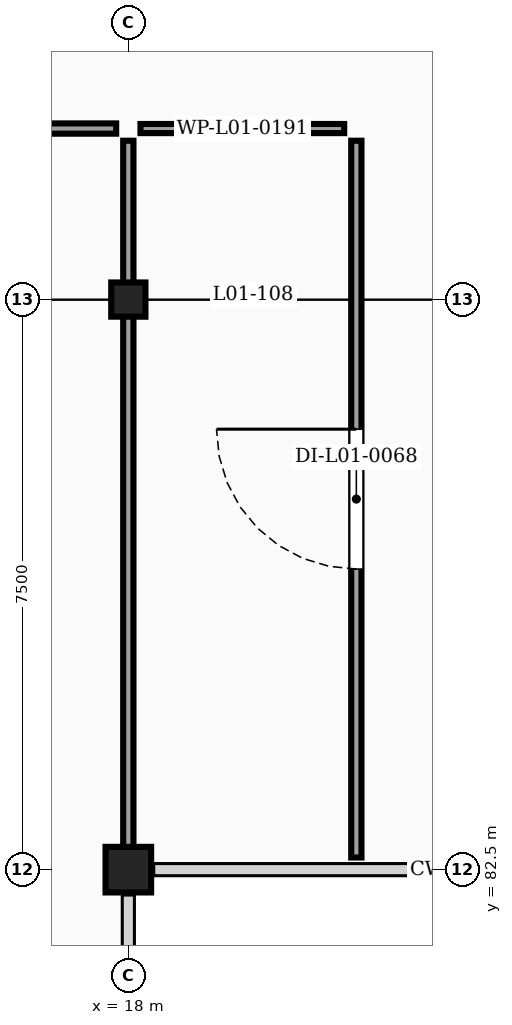
"""IFC4 building model, lengths in metres.
Left out: names, types, materials, properties, quantities, classifications, styles, units other than length and angle.
Written with IfcOpenShell. Run it as: python <this file> out.ifc"""

import sys

from ifc_helpers import new_model, si_unit, direction, frame, frame_2d, origin, origin_2d, place, context, subcontext, project, spatial, rectangle, extrude, element, fill, save


model = new_model("IFC4")
c1 = context("Model", 3, precision=1e-05, world=origin(), true_north=direction((0.0, 1.0)))
c2 = subcontext(c1, "Body", "Model", "MODEL_VIEW")
j1 = project(units=[si_unit("LENGTHUNIT", "METRE"), si_unit("PLANEANGLEUNIT", "RADIAN")], contexts=[c1])
p1 = place(None, origin())
s1 = spatial("IfcSite", under=j1, at=p1, CompositionType="ELEMENT")
p2 = place(p1, origin())
s2 = spatial("IfcBuilding", under=s1, at=p2, CompositionType="ELEMENT")
p3 = place(p2, frame((0.0, 0.0, 4.5)))
s3 = spatial("IfcBuildingStorey", under=s2, at=p3, CompositionType="ELEMENT", Elevation=4.5)
p4 = place(p3, frame((18.0, 82.5, 0.0), z_axis=(0.0, 0.0, 1.0), x_axis=(1.0, 0.0, 0.0)))
e1 = element("IfcColumn", 1, at=p4, inside=s3, PredefinedType="COLUMN", context=c2, shape_type="SweptSolid", body=[
    extrude(rectangle(XDim=0.6, YDim=0.6, at=origin_2d()), origin(), (0.0, 0.0, 1.0), 4.0),
])
p5 = place(p3, frame((18.0, 90.0, 0.0), z_axis=(0.0, 0.0, 1.0), x_axis=(1.0, 0.0, 0.0)))
e2 = element("IfcColumn", 2, at=p5, inside=s3, PredefinedType="COLUMN", context=c2, shape_type="SweptSolid", body=[
    extrude(rectangle(XDim=0.45, YDim=0.45, at=origin_2d()), origin(), (0.0, 0.0, 1.0), 4.0),
])
p6 = place(p3, frame((17.84, 92.25, 0.0), z_axis=(0.0, 0.0, 1.0), x_axis=(-1.0, 0.0, 0.0)))
e3 = element("IfcWall", 3, at=p6, inside=s3, PredefinedType="PARTITIONING", context=c2, shape_type="SweptSolid", body=[
    extrude(rectangle(XDim=4.34, YDim=0.135, at=frame_2d((2.17, 0.0))), origin(), (0.0, 0.0, 1.0), 3.76),
])
p7 = place(p6, frame((1.29, 0.0, 0.0)))
e4 = element("IfcOpeningElement", 4, at=p7, cuts=e3, PredefinedType="OPENING", context=c2, shape_type="SweptSolid", body=[
    extrude(rectangle(XDim=1.76, YDim=2.22, at=frame_2d((0.88, 1.11))), frame((0.0, 0.077, 0.0), z_axis=(0.0, -1.0, 0.0), x_axis=(1.0, 0.0, 0.0)), (0.0, 0.0, 1.0), 0.155),
])
p8 = place(p3, frame((21.0, 82.66, 0.0), z_axis=(0.0, 0.0, 1.0), x_axis=(0.0, 1.0, 0.0)))
e5 = element("IfcWall", 5, at=p8, inside=s3, PredefinedType="PARTITIONING", context=c2, shape_type="SweptSolid", body=[
    extrude(rectangle(XDim=9.43, YDim=0.135, at=frame_2d((4.715, 0.0))), origin(), (0.0, 0.0, 1.0), 3.302),
])
p9 = place(p8, frame((3.795, 0.0, 0.0)))
e6 = element("IfcOpeningElement", 6, at=p9, cuts=e5, PredefinedType="OPENING", context=c2, shape_type="SweptSolid", body=[
    extrude(rectangle(XDim=1.84, YDim=2.22, at=frame_2d((0.92, 1.11))), frame((0.0, 0.077, 0.0), z_axis=(0.0, -1.0, 0.0), x_axis=(1.0, 0.0, 0.0)), (0.0, 0.0, 1.0), 0.155),
])
p10 = place(p3, frame((20.84, 92.25, 0.0), z_axis=(0.0, 0.0, 1.0), x_axis=(-1.0, 0.0, 0.0)))
e7 = element("IfcWall", 7, at=p10, inside=s3, PredefinedType="PARTITIONING", context=c2, shape_type="SweptSolid", body=[
    extrude(rectangle(XDim=2.68, YDim=0.12, at=frame_2d((1.34, 0.0))), origin(), (0.0, 0.0, 1.0), 3.76),
])
p11 = place(p3, frame((18.0, 82.66, 0.0), z_axis=(0.0, 0.0, 1.0), x_axis=(0.0, 1.0, 0.0)))
e8 = element("IfcWall", 8, at=p11, inside=s3, PredefinedType="PARTITIONING", context=c2, shape_type="SweptSolid", body=[
    extrude(rectangle(XDim=9.43, YDim=0.135, at=frame_2d((4.715, 0.0))), origin(), (0.0, 0.0, 1.0), 2.96),
])
p12 = place(p9, origin())
e9 = element("IfcDoor", 9, at=p12, inside=s3, OperationType="SINGLE_SWING_RIGHT", PredefinedType="DOOR", context=c2, shape_type="SweptSolid", body=[
    extrude(rectangle(XDim=1.84, YDim=2.22, at=frame_2d((0.92, 1.11))), frame((0.0, 0.025, 0.0), z_axis=(0.0, -1.0, 0.0), x_axis=(1.0, 0.0, 0.0)), (0.0, 0.0, 1.0), 0.05),
])
fill(e6, e9)
save(model, sys.argv[1])
